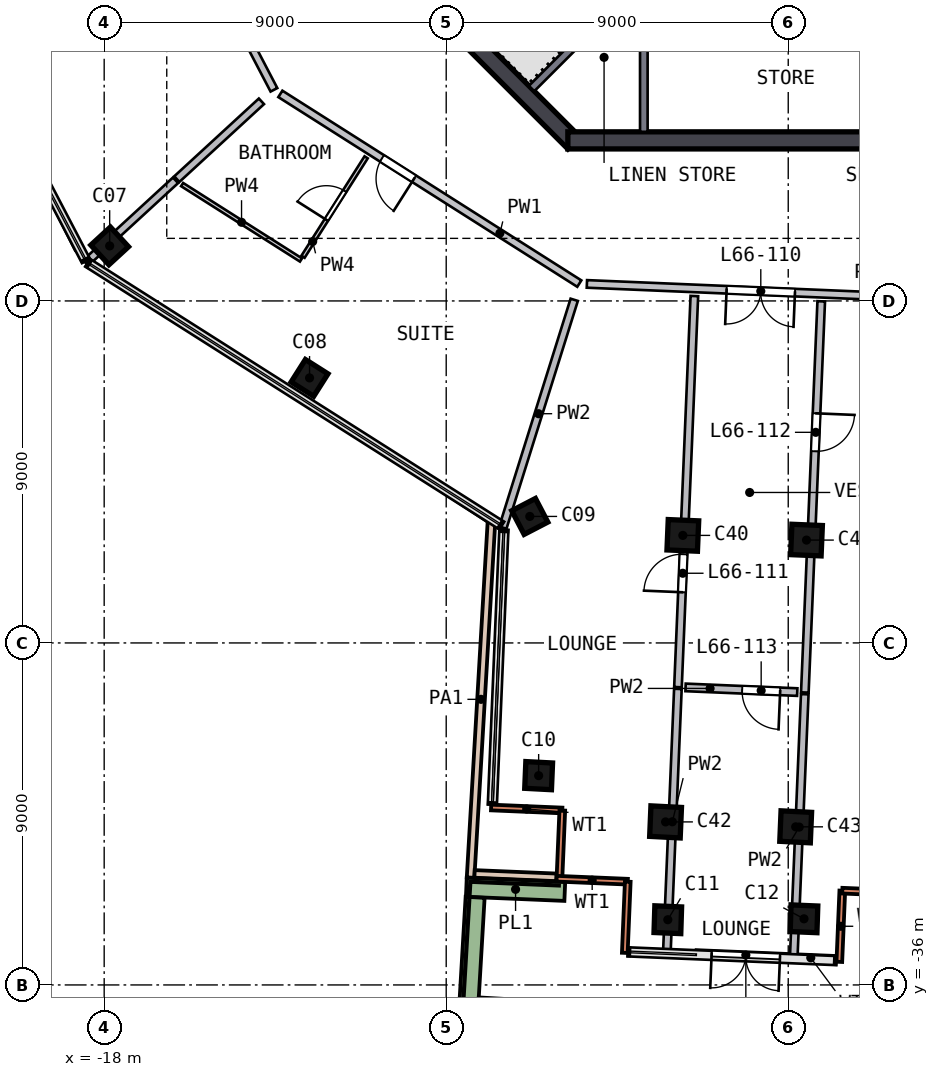
"""IFC4 building model, lengths in metres.
Left out: names, types, materials, properties, quantities, classifications, styles, units other than length and angle.
Written with IfcOpenShell. Run it as: python <this file> out.ifc"""

import sys

from ifc_helpers import new_model, si_unit, direction, frame, frame_2d, origin, origin_2d, place, context, subcontext, project, spatial, rectangle, extrude, element, fill, save


model = new_model("IFC4")
c1 = context("Model", 3, precision=1e-05, world=origin(), true_north=direction((0.0, 1.0)))
c2 = subcontext(c1, "Body", "Model", "MODEL_VIEW")
j1 = project(units=[si_unit("LENGTHUNIT", "METRE"), si_unit("PLANEANGLEUNIT", "RADIAN")], contexts=[c1])
p1 = place(None, origin())
s1 = spatial("IfcSite", under=j1, at=p1, CompositionType="ELEMENT")
p2 = place(p1, origin())
s2 = spatial("IfcBuilding", under=s1, at=p2, CompositionType="ELEMENT")
p3 = place(p2, frame((0.0, 0.0, 269.0)))
s3 = spatial("IfcBuildingStorey", under=s2, at=p3, CompositionType="ELEMENT", Elevation=269.0)
p4 = place(p3, frame((-17.923, -16.481, 0.0), z_axis=(0.055567624, -0.059355146, 0.996689122), x_axis=(-0.675008632, 0.733316452, 0.081303918)))
e1 = element("IfcColumn", 1, at=p4, inside=s3, PredefinedType="COLUMN", context=c2, shape_type="SweptSolid", body=[
    extrude(rectangle(XDim=0.7, YDim=0.7, at=origin_2d()), origin(), (0.0, 0.0, 1.0), 4.706),
])
p5 = place(p3, frame((-12.677, -19.975, 0.0), z_axis=(0.067097972, -0.041825959, 0.996869325), x_axis=(0.841492395, -0.534452469, -0.079063944)))
e2 = element("IfcColumn", 2, at=p5, inside=s3, PredefinedType="COLUMN", context=c2, shape_type="SweptSolid", body=[
    extrude(rectangle(XDim=0.7, YDim=0.7, at=origin_2d()), origin(), (0.0, 0.0, 1.0), 4.705),
])
p6 = place(p3, frame((-6.896, -23.644, 0.0), z_axis=(0.079168534, -0.022360182, 0.996610438), x_axis=(-0.459690496, 0.886286349, 0.056401724)))
e3 = element("IfcColumn", 3, at=p6, inside=s3, PredefinedType="COLUMN", context=c2, shape_type="SweptSolid", body=[
    extrude(rectangle(XDim=0.7, YDim=0.7, at=origin_2d()), origin(), (0.0, 0.0, 1.0), 4.706),
])
p7 = place(p3, frame((-6.687, -30.362, 0.0), z_axis=(0.098672383, -0.107478738, 0.989298783), x_axis=(-0.052341093, -0.993334684, -0.102696718)))
e4 = element("IfcColumn", 4, at=p7, inside=s3, PredefinedType="COLUMN", context=c2, shape_type="SweptSolid", body=[
    extrude(rectangle(XDim=0.7, YDim=0.7, at=origin_2d()), origin(), (0.0, 0.0, 1.0), 4.741),
])
p8 = place(p3, frame((-3.304, -34.167, 0.0), z_axis=(0.111168938, -0.096133583, 0.989140941), x_axis=(0.992926928, -0.031003358, -0.114607627)))
e5 = element("IfcColumn", 5, at=p8, inside=s3, PredefinedType="COLUMN", context=c2, shape_type="SweptSolid", body=[
    extrude(rectangle(XDim=0.7, YDim=0.7, at=origin_2d()), origin(), (0.0, 0.0, 1.0), 4.741),
])
p9 = place(p3, frame((0.28, -34.157, 0.0), z_axis=(0.111186081, -0.084381834, 0.990210766), x_axis=(0.99292035, -0.032471752, -0.114257442)))
e6 = element("IfcColumn", 6, at=p9, inside=s3, PredefinedType="COLUMN", context=c2, shape_type="SweptSolid", body=[
    extrude(rectangle(XDim=0.7, YDim=0.7, at=origin_2d()), origin(), (0.0, 0.0, 1.0), 4.736),
])
for number, where, z_axis, x_axis in (
    (7, (-2.871, -24.159, 0.0), (0.081, -0.009, 0.997), (-0.042, -0.999, -0.006)),
    (8, (0.383, -24.296, 0.0), (0.081, 0.002, 0.997), (-0.042, -0.999, 0.005)),
):
    element("IfcColumn", number, at=place(p3, frame(where, z_axis=z_axis, x_axis=x_axis)), inside=s3, PredefinedType="COLUMN", context=c2, shape_type="SweptSolid", body=[
        extrude(rectangle(XDim=0.8, YDim=0.8, at=origin_2d()), origin(), (0.0, 0.0, 1.0), 4.706),
    ])
p10 = place(p3, frame((-3.352, -31.593, 0.0), z_axis=(0.102763777, -0.096476324, 0.990016124), x_axis=(-0.051501931, -0.994466473, -0.091564101)))
e9 = element("IfcColumn", 9, at=p10, inside=s3, PredefinedType="COLUMN", context=c2, shape_type="SweptSolid", body=[
    extrude(rectangle(XDim=0.8, YDim=0.8, at=origin_2d()), origin(), (0.0, 0.0, 1.0), 4.737),
])
p11 = place(p3, frame((0.071, -31.736, 0.0), z_axis=(0.10322703, -0.085222915, 0.991000119), x_axis=(-0.050566581, -0.995483953, -0.080341268)))
e10 = element("IfcColumn", 10, at=p11, inside=s3, PredefinedType="COLUMN", context=c2, shape_type="SweptSolid", body=[
    extrude(rectangle(XDim=0.8, YDim=0.8, at=origin_2d()), origin(), (0.0, 0.0, 1.0), 4.732),
])
p12 = place(p3, frame((-13.841, -5.64, 0.0), z_axis=(0.0, 0.0, 1.0), x_axis=(0.707106781, -0.707106781, 0.0)))
e11 = element("IfcWall", 11, at=p12, inside=s3, PredefinedType="SHEAR", context=c2, shape_type="SweptSolid", body=[
    extrude(rectangle(XDim=11.598, YDim=0.45, at=frame_2d((5.799, 0.0))), origin(), (0.0, 0.0, 1.0), 5.0),
])
p13 = place(p12, frame((2.099, 0.0, 0.0)))
e12 = element("IfcOpeningElement", 12, at=p13, cuts=e11, PredefinedType="OPENING", context=c2, shape_type="SweptSolid", body=[
    extrude(rectangle(XDim=1.2, YDim=2.1, at=frame_2d((0.6, 1.05))), frame((0.0, 0.235, 0.0), z_axis=(0.0, -1.0, 0.0), x_axis=(1.0, 0.0, 0.0)), (0.0, 0.0, 1.0), 0.47),
])
p14 = place(p3, frame((-5.799, -13.775, 0.0), z_axis=(0.0, 0.0, 1.0), x_axis=(1.0, 0.0, 0.0)))
e13 = element("IfcWall", 13, at=p14, inside=s3, PredefinedType="SHEAR", context=c2, shape_type="SweptSolid", body=[
    extrude(rectangle(XDim=11.598, YDim=0.45, at=frame_2d((5.799, 0.0))), origin(), (0.0, 0.0, 1.0), 5.0),
])
p15 = place(p3, frame((-7.819, -31.331, 0.0), z_axis=(0.0, 0.0, 1.0), x_axis=(0.999126063, -0.041798445, 0.0)))
e14 = element("IfcWall", 14, at=p15, inside=s3, PredefinedType="SOLIDWALL", context=c2, shape_type="SweptSolid", body=[
    extrude(rectangle(XDim=1.875, YDim=0.15, at=frame_2d((0.938, 0.0))), origin(), (0.0, 0.0, 1.0), 4.69),
])
p16 = place(p3, frame((-5.946, -31.409, 0.0), z_axis=(0.0, 0.0, 1.0), x_axis=(-0.041777233, -0.99912695, 0.0)))
e15 = element("IfcWall", 15, at=p16, inside=s3, PredefinedType="SOLIDWALL", context=c2, shape_type="SweptSolid", body=[
    extrude(rectangle(XDim=1.8, YDim=0.15, at=frame_2d((0.9, 0.0))), origin(), (0.0, 0.0, 1.0), 4.69),
])
for number, where, z_axis, x_axis in (
    (16, (-6.096, -33.204, 0.0), (0.0, 0.0, 1.0), (0.999, -0.042, 0.0)),
    (17, (-4.222, -33.283, 0.0), (0.0, 0.0, 1.0), (-0.042, -0.999, 0.0)),
):
    element("IfcWall", number, at=place(p3, frame(where, z_axis=z_axis, x_axis=x_axis)), inside=s3, PredefinedType="SOLIDWALL", context=c2, shape_type="SweptSolid", body=[
        extrude(rectangle(XDim=1.875, YDim=0.15, at=frame_2d((0.938, 0.0))), origin(), (0.0, 0.0, 1.0), 4.69),
    ])
p17 = place(p3, frame((1.344, -35.393, 0.0), z_axis=(0.0, 0.0, 1.0), x_axis=(0.041922975, 0.999120846, 0.0)))
e18 = element("IfcWall", 18, at=p17, inside=s3, PredefinedType="SOLIDWALL", context=c2, shape_type="SweptSolid", body=[
    extrude(rectangle(XDim=1.875, YDim=0.15, at=frame_2d((0.938, 0.0))), origin(), (0.0, 0.0, 1.0), 4.69),
])
p18 = place(p3, frame((1.423, -33.519, 0.0), z_axis=(0.0, 0.0, 1.0), x_axis=(0.999121279, -0.041912636, 0.0)))
e19 = element("IfcWall", 19, at=p18, inside=s3, PredefinedType="SOLIDWALL", context=c2, shape_type="SweptSolid", body=[
    extrude(rectangle(XDim=1.8, YDim=0.15, at=frame_2d((0.9, 0.0))), origin(), (0.0, 0.0, 1.0), 4.69),
])
p19 = place(p3, frame((1.202, -35.312, 0.0), z_axis=(0.0, 0.0, 1.0), x_axis=(-0.99912264, 0.0418802, 0.0)))
e20 = element("IfcWall", 20, at=p19, inside=s3, PredefinedType="SOLIDWALL", context=c2, shape_type="SweptSolid", body=[
    extrude(rectangle(XDim=3.62, YDim=0.15, at=frame_2d((1.81, 0.0))), origin(), (0.0, 0.0, 1.0), 4.015),
])
p20 = place(p19, frame((1.42, 0.0, 0.0)))
e21 = element("IfcOpeningElement", 21, at=p20, cuts=e20, PredefinedType="OPENING", context=c2, shape_type="SweptSolid", body=[
    extrude(rectangle(XDim=1.8, YDim=2.4, at=frame_2d((0.9, 1.2))), frame((0.0, 0.085, 0.0), z_axis=(0.0, -1.0, 0.0), x_axis=(1.0, 0.0, 0.0)), (0.0, 0.0, 1.0), 0.17),
])
p21 = place(p3, frame((-5.88, -33.539, 0.0), z_axis=(0.0, 0.0, 1.0), x_axis=(-0.99912128, 0.04191261, 0.0)))
e22 = element("IfcWall", 22, at=p21, inside=s3, PredefinedType="SOLIDWALL", context=c2, shape_type="SweptSolid", body=[
    extrude(rectangle(XDim=2.592, YDim=0.5, at=frame_2d((1.296, 0.0))), origin(), (0.0, 0.0, 1.0), 0.7),
])
p22 = place(p3, frame((-8.239, -33.694, 0.0), z_axis=(0.0, 0.0, 1.0), x_axis=(-0.058607501, -0.998281103, 0.0)))
e23 = element("IfcWall", 23, at=p22, inside=s3, PredefinedType="SOLIDWALL", context=c2, shape_type="SweptSolid", body=[
    extrude(rectangle(XDim=3.124, YDim=0.5, at=frame_2d((1.562, 0.0))), origin(), (0.0, 0.0, 1.0), 0.7),
])
p23 = place(p3, frame((-7.808, -23.792, 0.0), z_axis=(0.0, 0.0, 1.0), x_axis=(-0.058618492, -0.998280458, 0.0)))
e24 = element("IfcWall", 24, at=p23, inside=s3, PredefinedType="PARAPET", context=c2, shape_type="SweptSolid", body=[
    extrude(rectangle(XDim=9.4, YDim=0.2, at=frame_2d((4.7, 0.0))), origin(), (0.0, 0.0, 1.0), 1.1),
])
p24 = place(p3, frame((-8.255, -33.079, 0.0), z_axis=(0.0, 0.0, 1.0), x_axis=(0.999121484, -0.041907752, 0.0)))
e25 = element("IfcWall", 25, at=p24, inside=s3, PredefinedType="PARAPET", context=c2, shape_type="SweptSolid", body=[
    extrude(rectangle(XDim=2.161, YDim=0.2, at=frame_2d((1.081, 0.0))), origin(), (0.0, 0.0, 1.0), 1.1),
])
p25 = place(p3, frame((-3.8, -10.9, 0.0), z_axis=(0.0, 0.0, 1.0), x_axis=(0.0, -1.0, 0.0)))
e26 = element("IfcWall", 26, at=p25, inside=s3, PredefinedType="SOLIDWALL", context=c2, shape_type="SweptSolid", body=[
    extrude(rectangle(XDim=2.65, YDim=0.2, at=frame_2d((1.325, 0.0))), origin(), (0.0, 0.0, 1.0), 4.69),
])
p26 = place(p3, frame((-3.677, -9.334, 0.0), z_axis=(0.0, 0.0, 1.0), x_axis=(-0.707106781, -0.707106781, 0.0)))
e27 = element("IfcWall", 27, at=p26, inside=s3, PredefinedType="SOLIDWALL", context=c2, shape_type="SweptSolid", body=[
    extrude(rectangle(XDim=4.35, YDim=0.2, at=frame_2d((2.175, 0.0))), origin(), (0.0, 0.0, 1.0), 4.69),
])
p27 = place(p3, frame((-13.533, -12.444, 0.0), z_axis=(0.0, 0.0, 1.0), x_axis=(-0.463303791, 0.886199525, 0.0)))
e28 = element("IfcWall", 28, at=p27, inside=s3, PredefinedType="SOLIDWALL", context=c2, shape_type="SweptSolid", body=[
    extrude(rectangle(XDim=9.317, YDim=0.2, at=frame_2d((4.658, 0.0))), origin(), (0.0, 0.0, 1.0), 4.69),
])
p28 = place(p27, frame((5.15, 0.0, 0.0)))
e29 = element("IfcOpeningElement", 29, at=p28, cuts=e28, PredefinedType="OPENING", context=c2, shape_type="SweptSolid", body=[
    extrude(rectangle(XDim=1.0, YDim=2.1, at=frame_2d((0.5, 1.05))), frame((0.0, 0.11, 0.0), z_axis=(0.0, -1.0, 0.0), x_axis=(1.0, 0.0, 0.0)), (0.0, 0.0, 1.0), 0.22),
])
p29 = place(p3, frame((-5.498, -17.543, 0.0), z_axis=(0.0, 0.0, 1.0), x_axis=(-0.844333068, 0.535818692, 0.0)))
e30 = element("IfcWall", 30, at=p29, inside=s3, PredefinedType="SOLIDWALL", context=c2, shape_type="SweptSolid", body=[
    extrude(rectangle(XDim=9.316, YDim=0.2, at=frame_2d((4.658, 0.0))), origin(), (0.0, 0.0, 1.0), 4.69),
])
p30 = place(p29, frame((5.15, 0.0, 0.0)))
e31 = element("IfcOpeningElement", 31, at=p30, cuts=e30, PredefinedType="OPENING", context=c2, shape_type="SweptSolid", body=[
    extrude(rectangle(XDim=1.0, YDim=2.1, at=frame_2d((0.5, 1.05))), frame((0.0, 0.11, 0.0), z_axis=(0.0, -1.0, 0.0), x_axis=(1.0, 0.0, 0.0)), (0.0, 0.0, 1.0), 0.22),
])
p31 = place(p3, frame((4.01, -17.942, 0.0), z_axis=(0.0, 0.0, 1.0), x_axis=(-0.999123966, 0.041848536, 0.0)))
e32 = element("IfcWall", 32, at=p31, inside=s3, PredefinedType="SOLIDWALL", context=c2, shape_type="SweptSolid", body=[
    extrude(rectangle(XDim=9.317, YDim=0.2, at=frame_2d((4.658, 0.0))), origin(), (0.0, 0.0, 1.0), 4.69),
])
p32 = place(p31, frame((3.837, 0.0, 0.0)))
e33 = element("IfcOpeningElement", 33, at=p32, cuts=e32, PredefinedType="OPENING", context=c2, shape_type="SweptSolid", body=[
    extrude(rectangle(XDim=1.8, YDim=2.1, at=frame_2d((0.9, 1.05))), frame((0.0, 0.11, 0.0), z_axis=(0.0, -1.0, 0.0), x_axis=(1.0, 0.0, 0.0)), (0.0, 0.0, 1.0), 0.22),
])
p33 = place(p3, frame((-16.123, -14.825, 0.0), z_axis=(0.0, 0.0, 1.0), x_axis=(-0.736099185, -0.676873688, 0.0)))
e34 = element("IfcWall", 34, at=p33, inside=s3, PredefinedType="SOLIDWALL", context=c2, shape_type="SweptSolid", body=[
    extrude(rectangle(XDim=3.211, YDim=0.2, at=frame_2d((1.605, 0.0))), origin(), (0.0, 0.0, 1.0), 4.69),
])
p34 = place(p3, frame((-13.862, -12.747, 0.0), z_axis=(0.0, 0.0, 1.0), x_axis=(-0.736111178, -0.676860646, 0.0)))
e35 = element("IfcWall", 35, at=p34, inside=s3, PredefinedType="SOLIDWALL", context=c2, shape_type="SweptSolid", body=[
    extrude(rectangle(XDim=3.024, YDim=0.2, at=frame_2d((1.512, 0.0))), origin(), (0.0, 0.0, 1.0), 4.69),
])
p35 = place(p3, frame((-7.51, -23.965, 0.0), z_axis=(0.0, 0.0, 1.0), x_axis=(0.299013997, 0.954248725, 0.0)))
e36 = element("IfcWall", 36, at=p35, inside=s3, PredefinedType="SOLIDWALL", context=c2, shape_type="SweptSolid", body=[
    extrude(rectangle(XDim=6.282, YDim=0.2, at=frame_2d((3.141, 0.0))), origin(), (0.0, 0.0, 1.0), 4.69),
])
p36 = place(p3, frame((-2.904, -28.209, 0.0), z_axis=(0.0, 0.0, 1.0), x_axis=(-0.041858334, -0.999123556, 0.0)))
e37 = element("IfcWall", 37, at=p36, inside=s3, PredefinedType="SOLIDWALL", context=c2, shape_type="SweptSolid", body=[
    extrude(rectangle(XDim=6.999, YDim=0.2, at=frame_2d((3.5, 0.0))), origin(), (0.0, 0.0, 1.0), 4.69),
])
p37 = place(p3, frame((-2.902, -28.164, 0.0), z_axis=(0.0, 0.0, 1.0), x_axis=(0.041875002, 0.999122857, 0.0)))
e38 = element("IfcWall", 38, at=p37, inside=s3, PredefinedType="SOLIDWALL", context=c2, shape_type="SweptSolid", body=[
    extrude(rectangle(XDim=10.302, YDim=0.2, at=frame_2d((5.151, 0.0))), origin(), (0.0, 0.0, 1.0), 4.69),
])
p38 = place(p37, frame((2.5, 0.0, 0.0)))
e39 = element("IfcOpeningElement", 39, at=p38, cuts=e38, PredefinedType="OPENING", context=c2, shape_type="SweptSolid", body=[
    extrude(rectangle(XDim=1.0, YDim=2.1, at=frame_2d((0.5, 1.05))), frame((0.0, 0.11, 0.0), z_axis=(0.0, -1.0, 0.0), x_axis=(1.0, 0.0, 0.0)), (0.0, 0.0, 1.0), 0.22),
])
p39 = place(p3, frame((0.237, -28.293, 0.0), z_axis=(0.0, 0.0, 1.0), x_axis=(-0.999120946, 0.041920578, 0.0)))
e40 = element("IfcWall", 40, at=p39, inside=s3, PredefinedType="SOLIDWALL", context=c2, shape_type="SweptSolid", body=[
    extrude(rectangle(XDim=2.941, YDim=0.2, at=frame_2d((1.471, 0.0))), origin(), (0.0, 0.0, 1.0), 4.69),
])
p40 = place(p39, frame((0.45, 0.0, 0.0)))
e41 = element("IfcOpeningElement", 41, at=p40, cuts=e40, PredefinedType="OPENING", context=c2, shape_type="SweptSolid", body=[
    extrude(rectangle(XDim=1.0, YDim=2.1, at=frame_2d((0.5, 1.05))), frame((0.0, 0.11, 0.0), z_axis=(0.0, -1.0, 0.0), x_axis=(1.0, 0.0, 0.0)), (0.0, 0.0, 1.0), 0.22),
])
p41 = place(p3, frame((0.142, -35.342, 0.0), z_axis=(0.0, 0.0, 1.0), x_axis=(0.041893155, 0.999122096, 0.0)))
e42 = element("IfcWall", 42, at=p41, inside=s3, PredefinedType="SOLIDWALL", context=c2, shape_type="SweptSolid", body=[
    extrude(rectangle(XDim=6.999, YDim=0.2, at=frame_2d((3.5, 0.0))), origin(), (0.0, 0.0, 1.0), 4.69),
])
p42 = place(p3, frame((0.868, -18.01, 0.0), z_axis=(0.0, 0.0, 1.0), x_axis=(-0.041875002, -0.999122857, 0.0)))
e43 = element("IfcWall", 43, at=p42, inside=s3, PredefinedType="SOLIDWALL", context=c2, shape_type="SweptSolid", body=[
    extrude(rectangle(XDim=10.302, YDim=0.2, at=frame_2d((5.151, 0.0))), origin(), (0.0, 0.0, 1.0), 4.69),
])
p43 = place(p42, frame((2.95, 0.0, 0.0)))
e44 = element("IfcOpeningElement", 44, at=p43, cuts=e43, PredefinedType="OPENING", context=c2, shape_type="SweptSolid", body=[
    extrude(rectangle(XDim=1.0, YDim=2.1, at=frame_2d((0.5, 1.05))), frame((0.0, 0.11, 0.0), z_axis=(0.0, -1.0, 0.0), x_axis=(1.0, 0.0, 0.0)), (0.0, 0.0, 1.0), 0.22),
])
p44 = place(p3, frame((-12.822, -16.922, 0.0), z_axis=(0.0, 0.0, 1.0), x_axis=(-0.844342036, 0.53580456, 0.0)))
e45 = element("IfcWall", 45, at=p44, inside=s3, PredefinedType="PARTITIONING", context=c2, shape_type="SweptSolid", body=[
    extrude(rectangle(XDim=3.704, YDim=0.1, at=frame_2d((1.852, 0.0))), origin(), (0.0, 0.0, 1.0), 4.69),
])
p45 = place(p3, frame((-12.768, -16.838, 0.0), z_axis=(0.0, 0.0, 1.0), x_axis=(0.535876266, 0.844296528, 0.0)))
e46 = element("IfcWall", 46, at=p45, inside=s3, PredefinedType="PARTITIONING", context=c2, shape_type="SweptSolid", body=[
    extrude(rectangle(XDim=3.1, YDim=0.1, at=frame_2d((1.55, 0.0))), origin(), (0.0, 0.0, 1.0), 4.69),
])
p46 = place(p45, frame((1.15, 0.0, 0.0)))
e47 = element("IfcOpeningElement", 47, at=p46, cuts=e46, PredefinedType="OPENING", context=c2, shape_type="SweptSolid", body=[
    extrude(rectangle(XDim=0.9, YDim=2.1, at=frame_2d((0.45, 1.05))), frame((0.0, 0.06, 0.0), z_axis=(0.0, -1.0, 0.0), x_axis=(1.0, 0.0, 0.0)), (0.0, 0.0, 1.0), 0.12),
])
p47 = place(p20, origin())
e48 = element("IfcDoor", 48, at=p47, inside=s3, OperationType="DOUBLE_DOOR_SINGLE_SWING", PredefinedType="DOOR", context=c2, shape_type="SweptSolid", body=[
    extrude(rectangle(XDim=1.8, YDim=2.4, at=frame_2d((0.9, 1.2))), frame((0.0, 0.025, 0.0), z_axis=(0.0, -1.0, 0.0), x_axis=(1.0, 0.0, 0.0)), (0.0, 0.0, 1.0), 0.05),
])
fill(e21, e48)
p48 = place(p30, origin())
e49 = element("IfcDoor", 49, at=p48, inside=s3, OperationType="SINGLE_SWING_LEFT", PredefinedType="DOOR", context=c2, shape_type="SweptSolid", body=[
    extrude(rectangle(XDim=1.0, YDim=2.1, at=frame_2d((0.5, 1.05))), frame((0.0, 0.025, 0.0), z_axis=(0.0, -1.0, 0.0), x_axis=(1.0, 0.0, 0.0)), (0.0, 0.0, 1.0), 0.05),
])
fill(e31, e49)
p49 = place(p46, origin())
e50 = element("IfcDoor", 50, at=p49, inside=s3, OperationType="SINGLE_SWING_LEFT", PredefinedType="DOOR", context=c2, shape_type="SweptSolid", body=[
    extrude(rectangle(XDim=0.9, YDim=2.1, at=frame_2d((0.45, 1.05))), frame((0.0, 0.025, 0.0), z_axis=(0.0, -1.0, 0.0), x_axis=(1.0, 0.0, 0.0)), (0.0, 0.0, 1.0), 0.05),
])
fill(e47, e50)
p50 = place(p32, origin())
e51 = element("IfcDoor", 51, at=p50, inside=s3, OperationType="DOUBLE_DOOR_SINGLE_SWING", PredefinedType="DOOR", context=c2, shape_type="SweptSolid", body=[
    extrude(rectangle(XDim=1.8, YDim=2.1, at=frame_2d((0.9, 1.05))), frame((0.0, 0.025, 0.0), z_axis=(0.0, -1.0, 0.0), x_axis=(1.0, 0.0, 0.0)), (0.0, 0.0, 1.0), 0.05),
])
fill(e33, e51)
p51 = place(p38, origin())
e52 = element("IfcDoor", 52, at=p51, inside=s3, OperationType="SINGLE_SWING_LEFT", PredefinedType="DOOR", context=c2, shape_type="SweptSolid", body=[
    extrude(rectangle(XDim=1.0, YDim=2.1, at=frame_2d((0.5, 1.05))), frame((0.0, 0.025, 0.0), z_axis=(0.0, -1.0, 0.0), x_axis=(1.0, 0.0, 0.0)), (0.0, 0.0, 1.0), 0.05),
])
fill(e39, e52)
p52 = place(p43, origin())
e53 = element("IfcDoor", 53, at=p52, inside=s3, OperationType="SINGLE_SWING_LEFT", PredefinedType="DOOR", context=c2, shape_type="SweptSolid", body=[
    extrude(rectangle(XDim=1.0, YDim=2.1, at=frame_2d((0.5, 1.05))), frame((0.0, 0.025, 0.0), z_axis=(0.0, -1.0, 0.0), x_axis=(1.0, 0.0, 0.0)), (0.0, 0.0, 1.0), 0.05),
])
fill(e44, e53)
p53 = place(p40, origin())
e54 = element("IfcDoor", 54, at=p53, inside=s3, OperationType="SINGLE_SWING_LEFT", PredefinedType="DOOR", context=c2, shape_type="SweptSolid", body=[
    extrude(rectangle(XDim=1.0, YDim=2.1, at=frame_2d((0.5, 1.05))), frame((0.0, 0.025, 0.0), z_axis=(0.0, -1.0, 0.0), x_axis=(1.0, 0.0, 0.0)), (0.0, 0.0, 1.0), 0.05),
])
fill(e41, e54)
save(model, sys.argv[1])
